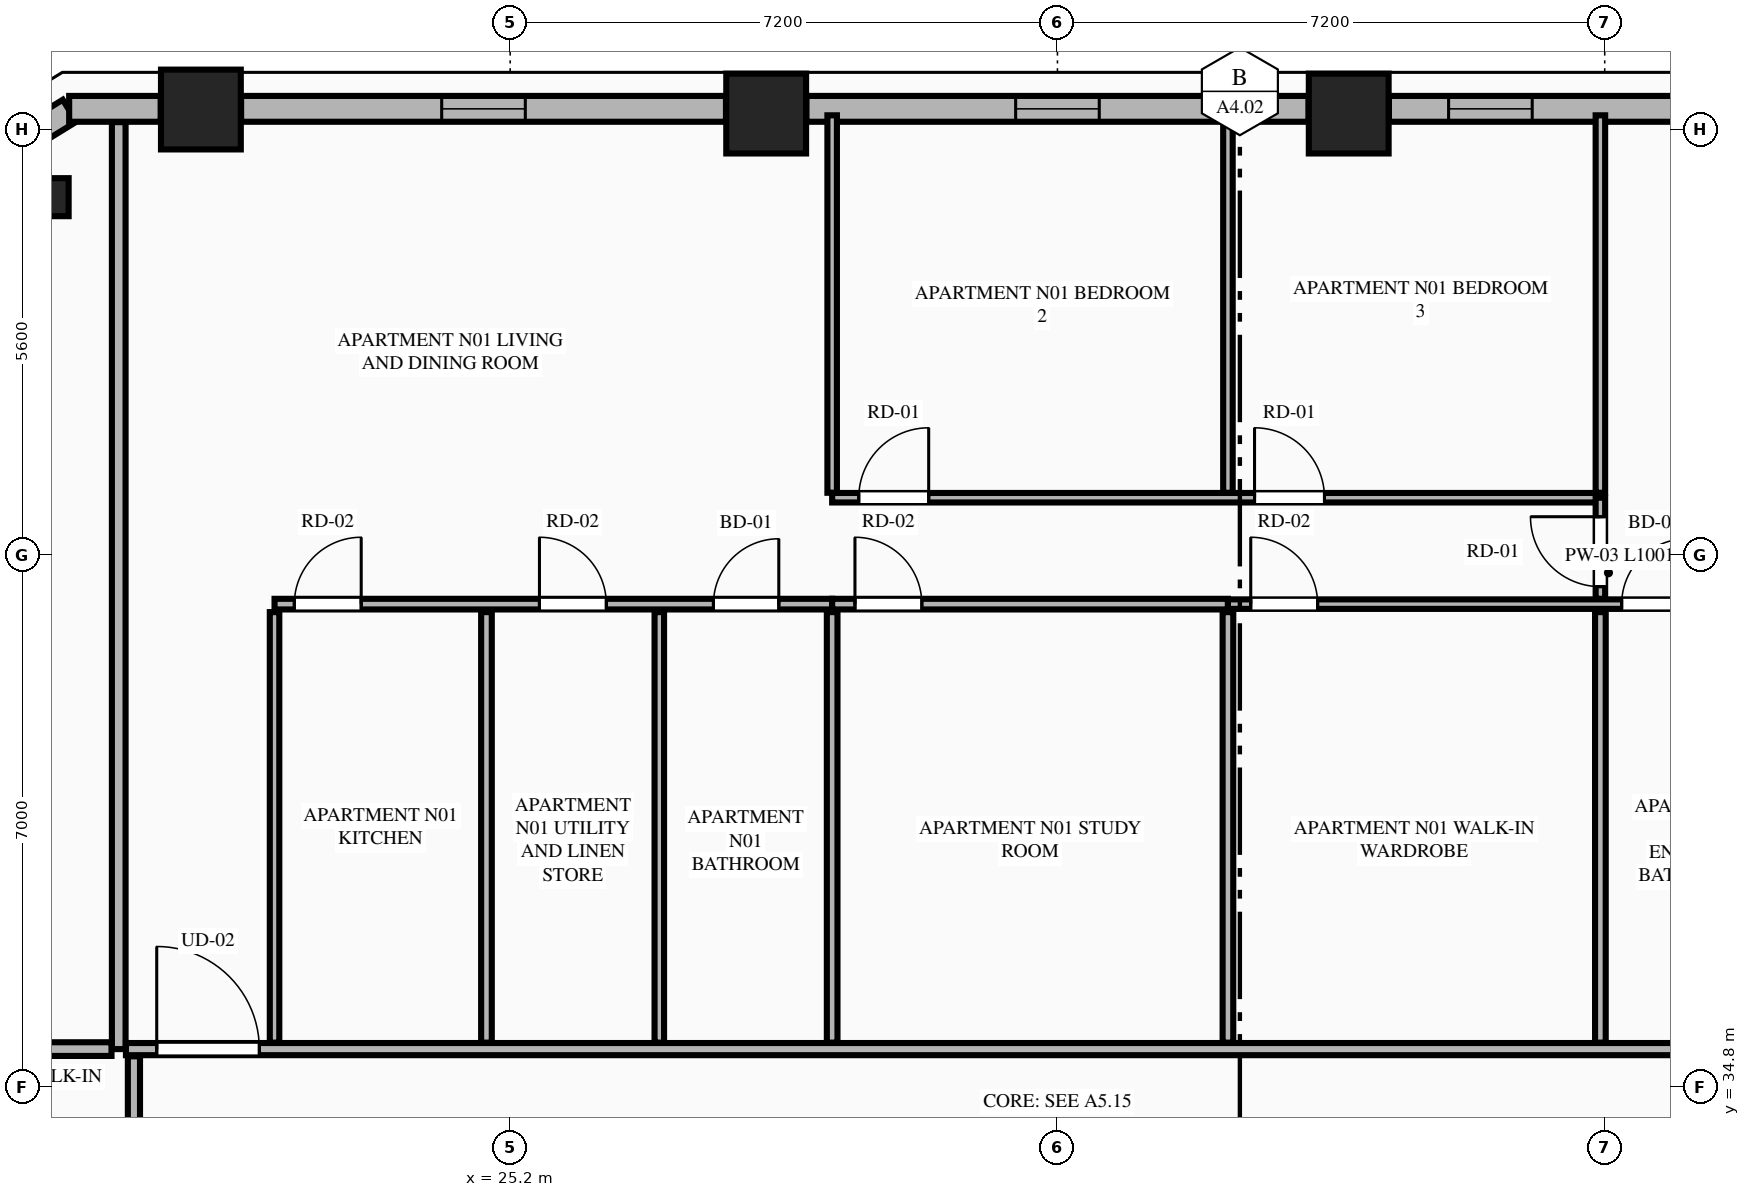
"""IFC4 building model, lengths in metres.
Left out: names, types, materials, properties, quantities, classifications, styles, units other than length and angle.
Written with IfcOpenShell. Run it as: python <this file> out.ifc"""

import sys

from ifc_helpers import new_model, si_unit, direction, frame, frame_2d, origin, origin_2d, place, context, subcontext, project, spatial, rectangle, extrude, element, fill, save


model = new_model("IFC4")
c1 = context("Model", 3, precision=1e-05, world=origin(), true_north=direction((0.0, 1.0)))
c2 = subcontext(c1, "Body", "Model", "MODEL_VIEW")
j1 = project(units=[si_unit("LENGTHUNIT", "METRE"), si_unit("PLANEANGLEUNIT", "RADIAN")], contexts=[c1])
p1 = place(None, origin())
s1 = spatial("IfcSite", under=j1, at=p1, CompositionType="ELEMENT")
p2 = place(p1, origin())
s2 = spatial("IfcBuilding", under=s1, at=p2, CompositionType="ELEMENT")
p3 = place(p2, frame((0.0, 0.0, 126.8)))
s3 = spatial("IfcBuildingStorey", under=s2, at=p3, CompositionType="ELEMENT", Elevation=126.8)
for number, where, z_axis, x_axis in (
    (1, (36.232, 47.608, 0.0), (0.0, 0.0, 1.0), (1.0, 0.0, 0.0)),
    (2, (28.568, 47.608, 0.0), (0.0, 0.0, 1.0), (1.0, 0.0, 0.0)),
    (3, (21.131, 47.661, 0.0), (0.0, 0.0, 1.0), (1.0, 0.0, 0.0)),
):
    element("IfcColumn", number, at=place(p3, frame(where, z_axis=z_axis, x_axis=x_axis)), inside=s3, PredefinedType="COLUMN", context=c2, shape_type="SweptSolid", body=[
        extrude(rectangle(XDim=1.05, YDim=1.05, at=origin_2d()), origin(), (0.0, 0.0, 1.0), 3.55),
    ])
p4 = place(p3, frame((19.141, 46.508, 0.0), z_axis=(0.0, 0.0, 1.0), x_axis=(-0.865160173452, -0.501495637342, 0.0)))
e4 = element("IfcColumn", 4, at=p4, inside=s3, PredefinedType="PILASTER", context=c2, shape_type="SweptSolid", body=[
    extrude(rectangle(XDim=0.5, YDim=0.35, at=origin_2d()), origin(), (0.0, 0.0, 1.0), 3.55),
])
p5 = place(p3, frame((19.403, 47.645, 0.0), z_axis=(0.0, 0.0, 1.0), x_axis=(-0.851798915137, -0.523868884523, 0.0)))
e5 = element("IfcWall", 5, at=p5, inside=s3, PredefinedType="STANDARD", context=c2, shape_type="SweptSolid", body=[
    extrude(rectangle(XDim=1.848, YDim=0.34, at=frame_2d((0.924, 0.0))), origin(), (0.0, 0.0, 1.0), 3.34),
])
p6 = place(p3, frame((43.14, 47.67, 0.0), z_axis=(0.0, 0.0, 1.0), x_axis=(-1.0, 0.0, 0.0)))
e6 = element("IfcWall", 6, at=p6, inside=s3, PredefinedType="STANDARD", context=c2, shape_type="SweptSolid", body=[
    extrude(rectangle(XDim=6.379, YDim=0.34, at=frame_2d((3.189, 0.0))), origin(), (0.0, 0.0, 1.0), 2.797),
])
p7 = place(p6, frame((1.192, 0.0, 0.75)))
e7 = element("IfcOpeningElement", 7, at=p7, cuts=e6, PredefinedType="OPENING", context=c2, shape_type="SweptSolid", body=[
    extrude(rectangle(XDim=1.1, YDim=1.897, at=frame_2d((0.55, 0.948))), frame((0.0, 0.18, 0.0), z_axis=(0.0, -1.0, 0.0), x_axis=(1.0, 0.0, 0.0)), (0.0, 0.0, 1.0), 0.36),
])
p8 = place(p6, frame((4.494, 0.0, 0.75)))
e8 = element("IfcOpeningElement", 8, at=p8, cuts=e6, PredefinedType="OPENING", context=c2, shape_type="SweptSolid", body=[
    extrude(rectangle(XDim=1.1, YDim=1.897, at=frame_2d((0.55, 0.948))), frame((0.0, 0.18, 0.0), z_axis=(0.0, -1.0, 0.0), x_axis=(1.0, 0.0, 0.0)), (0.0, 0.0, 1.0), 0.36),
])
p9 = place(p3, frame((35.703, 47.67, 0.0), z_axis=(0.0, 0.0, 1.0), x_axis=(-1.0, 0.0, 0.0)))
e9 = element("IfcWall", 9, at=p9, inside=s3, PredefinedType="STANDARD", context=c2, shape_type="SweptSolid", body=[
    extrude(rectangle(XDim=6.606, YDim=0.34, at=frame_2d((3.303, 0.0))), origin(), (0.0, 0.0, 1.0), 2.797),
])
p10 = place(p9, frame((2.753, 0.0, 0.75)))
e10 = element("IfcOpeningElement", 10, at=p10, cuts=e9, PredefinedType="OPENING", context=c2, shape_type="SweptSolid", body=[
    extrude(rectangle(XDim=1.1, YDim=1.897, at=frame_2d((0.55, 0.948))), frame((0.0, 0.18, 0.0), z_axis=(0.0, -1.0, 0.0), x_axis=(1.0, 0.0, 0.0)), (0.0, 0.0, 1.0), 0.36),
])
p11 = place(p3, frame((28.039, 47.67, 0.0), z_axis=(0.0, 0.0, 1.0), x_axis=(-1.0, 0.0, 0.0)))
e11 = element("IfcWall", 11, at=p11, inside=s3, PredefinedType="STANDARD", context=c2, shape_type="SweptSolid", body=[
    extrude(rectangle(XDim=6.379, YDim=0.34, at=frame_2d((3.189, 0.0))), origin(), (0.0, 0.0, 1.0), 2.797),
])
p12 = place(p11, frame((2.64, 0.0, 0.75)))
e12 = element("IfcOpeningElement", 12, at=p12, cuts=e11, PredefinedType="OPENING", context=c2, shape_type="SweptSolid", body=[
    extrude(rectangle(XDim=1.1, YDim=1.897, at=frame_2d((0.55, 0.948))), frame((0.0, 0.18, 0.0), z_axis=(0.0, -1.0, 0.0), x_axis=(1.0, 0.0, 0.0)), (0.0, 0.0, 1.0), 0.36),
])
p13 = place(p3, frame((20.602, 47.67, 0.0), z_axis=(0.0, 0.0, 1.0), x_axis=(-1.0, 0.0, 0.0)))
e13 = element("IfcWall", 13, at=p13, inside=s3, PredefinedType="STANDARD", context=c2, shape_type="SweptSolid", body=[
    extrude(rectangle(XDim=1.204, YDim=0.34, at=frame_2d((0.602, 0.0))), origin(), (0.0, 0.0, 1.0), 3.34),
])
p14 = place(p3, frame((20.05, 35.3, 0.0), z_axis=(0.0, 0.0, 1.0), x_axis=(0.0, 1.0, 0.0)))
e14 = element("IfcWall", 14, at=p14, inside=s3, PredefinedType="PARTITIONING", context=c2, shape_type="SweptSolid", body=[
    extrude(rectangle(XDim=12.195, YDim=0.18, at=frame_2d((6.098, 0.0))), origin(), (0.0, 0.0, 1.0), 3.34),
])
p15 = place(p3, frame((20.145, 35.3, 0.0), z_axis=(0.0, 0.0, 1.0), x_axis=(1.0, 0.0, 0.0)))
e15 = element("IfcWall", 15, at=p15, inside=s3, PredefinedType="PARTITIONING", context=c2, shape_type="SweptSolid", body=[
    extrude(rectangle(XDim=24.51, YDim=0.16, at=frame_2d((12.255, 0.0))), origin(), (0.0, 0.0, 1.0), 3.34),
])
p16 = place(p15, frame((0.405, 0.0, 0.0)))
e16 = element("IfcOpeningElement", 16, at=p16, cuts=e15, PredefinedType="OPENING", context=c2, shape_type="SweptSolid", body=[
    extrude(rectangle(XDim=1.35, YDim=2.35, at=frame_2d((0.675, 1.175))), frame((0.0, 0.09, 0.0), z_axis=(0.0, -1.0, 0.0), x_axis=(1.0, 0.0, 0.0)), (0.0, 0.0, 1.0), 0.18),
])
p17 = place(p3, frame((22.1, 35.385, 0.0), z_axis=(0.0, 0.0, 1.0), x_axis=(0.0, 1.0, 0.0)))
e17 = element("IfcWall", 17, at=p17, inside=s3, PredefinedType="PARTITIONING", context=c2, shape_type="SweptSolid", body=[
    extrude(rectangle(XDim=5.664, YDim=0.125, at=frame_2d((2.832, 0.0))), origin(), (0.0, 0.0, 1.0), 2.722),
])
p18 = place(p3, frame((22.1, 41.154, 0.0), z_axis=(0.0, 0.0, 1.0), x_axis=(1.0, 0.0, 0.0)))
e18 = element("IfcWall", 18, at=p18, inside=s3, PredefinedType="PLUMBINGWALL", context=c2, shape_type="SweptSolid", body=[
    extrude(rectangle(XDim=7.336, YDim=0.14, at=frame_2d((3.668, 0.0))), origin(), (0.0, 0.0, 1.0), 3.34),
])
p19 = place(p18, frame((5.774, 0.0, 0.0)))
e19 = element("IfcOpeningElement", 19, at=p19, cuts=e18, PredefinedType="OPENING", context=c2, shape_type="SweptSolid", body=[
    extrude(rectangle(XDim=0.86, YDim=2.1, at=frame_2d((0.43, 1.05))), frame((0.0, 0.08, 0.0), z_axis=(0.0, -1.0, 0.0), x_axis=(1.0, 0.0, 0.0)), (0.0, 0.0, 1.0), 0.16),
])
p20 = place(p18, frame((0.26, 0.0, 0.0)))
e20 = element("IfcOpeningElement", 20, at=p20, cuts=e18, PredefinedType="OPENING", context=c2, shape_type="SweptSolid", body=[
    extrude(rectangle(XDim=0.88, YDim=2.15, at=frame_2d((0.44, 1.075))), frame((0.0, 0.08, 0.0), z_axis=(0.0, -1.0, 0.0), x_axis=(1.0, 0.0, 0.0)), (0.0, 0.0, 1.0), 0.16),
])
p21 = place(p18, frame((3.485, 0.0, 0.0)))
e21 = element("IfcOpeningElement", 21, at=p21, cuts=e18, PredefinedType="OPENING", context=c2, shape_type="SweptSolid", body=[
    extrude(rectangle(XDim=0.88, YDim=2.15, at=frame_2d((0.44, 1.075))), frame((0.0, 0.08, 0.0), z_axis=(0.0, -1.0, 0.0), x_axis=(1.0, 0.0, 0.0)), (0.0, 0.0, 1.0), 0.16),
])
p22 = place(p3, frame((29.436, 41.154, 0.0), z_axis=(0.0, 0.0, 1.0), x_axis=(1.0, 0.0, 0.0)))
e22 = element("IfcWall", 22, at=p22, inside=s3, PredefinedType="PLUMBINGWALL", context=c2, shape_type="SweptSolid", body=[
    extrude(rectangle(XDim=5.207, YDim=0.14, at=frame_2d((2.604, 0.0))), origin(), (0.0, 0.0, 1.0), 3.34),
])
p23 = place(p22, frame((0.3, 0.0, 0.0)))
e23 = element("IfcOpeningElement", 23, at=p23, cuts=e22, PredefinedType="OPENING", context=c2, shape_type="SweptSolid", body=[
    extrude(rectangle(XDim=0.88, YDim=2.15, at=frame_2d((0.44, 1.075))), frame((0.0, 0.08, 0.0), z_axis=(0.0, -1.0, 0.0), x_axis=(1.0, 0.0, 0.0)), (0.0, 0.0, 1.0), 0.16),
])
p24 = place(p3, frame((34.643, 41.154, 0.0), z_axis=(0.0, 0.0, 1.0), x_axis=(1.0, 0.0, 0.0)))
e24 = element("IfcWall", 24, at=p24, inside=s3, PredefinedType="PARTITIONING", context=c2, shape_type="SweptSolid", body=[
    extrude(rectangle(XDim=10.012, YDim=0.125, at=frame_2d((5.006, 0.0))), origin(), (0.0, 0.0, 1.0), 3.34),
])
p25 = place(p24, frame((5.18, 0.0, 0.0)))
e25 = element("IfcOpeningElement", 25, at=p25, cuts=e24, PredefinedType="OPENING", context=c2, shape_type="SweptSolid", body=[
    extrude(rectangle(XDim=0.86, YDim=2.1, at=frame_2d((0.43, 1.05))), frame((0.0, 0.073, 0.0), z_axis=(0.0, -1.0, 0.0), x_axis=(1.0, 0.0, 0.0)), (0.0, 0.0, 1.0), 0.145),
])
p26 = place(p24, frame((7.604, 0.0, 0.0)))
e26 = element("IfcOpeningElement", 26, at=p26, cuts=e24, PredefinedType="OPENING", context=c2, shape_type="SweptSolid", body=[
    extrude(rectangle(XDim=0.88, YDim=2.15, at=frame_2d((0.44, 1.075))), frame((0.0, 0.073, 0.0), z_axis=(0.0, -1.0, 0.0), x_axis=(1.0, 0.0, 0.0)), (0.0, 0.0, 1.0), 0.145),
])
p27 = place(p24, frame((0.3, 0.0, 0.0)))
e27 = element("IfcOpeningElement", 27, at=p27, cuts=e24, PredefinedType="OPENING", context=c2, shape_type="SweptSolid", body=[
    extrude(rectangle(XDim=0.88, YDim=2.15, at=frame_2d((0.44, 1.075))), frame((0.0, 0.073, 0.0), z_axis=(0.0, -1.0, 0.0), x_axis=(1.0, 0.0, 0.0)), (0.0, 0.0, 1.0), 0.145),
])
p28 = place(p3, frame((24.888, 35.385, 0.0), z_axis=(0.0, 0.0, 1.0), x_axis=(0.0, 1.0, 0.0)))
e28 = element("IfcWall", 28, at=p28, inside=s3, PredefinedType="PLUMBINGWALL", context=c2, shape_type="SweptSolid", body=[
    extrude(rectangle(XDim=5.664, YDim=0.14, at=frame_2d((2.832, 0.0))), origin(), (0.0, 0.0, 1.0), 3.34),
])
p29 = place(p3, frame((27.162, 35.385, 0.0), z_axis=(0.0, 0.0, 1.0), x_axis=(0.0, 1.0, 0.0)))
e29 = element("IfcWall", 29, at=p29, inside=s3, PredefinedType="PARTITIONING", context=c2, shape_type="SweptSolid", body=[
    extrude(rectangle(XDim=5.664, YDim=0.125, at=frame_2d((2.832, 0.0))), origin(), (0.0, 0.0, 1.0), 3.34),
])
p30 = place(p3, frame((29.436, 42.619, 0.0), z_axis=(0.0, 0.0, 1.0), x_axis=(0.0, 1.0, 0.0)))
e30 = element("IfcWall", 30, at=p30, inside=s3, PredefinedType="PARTITIONING", context=c2, shape_type="SweptSolid", body=[
    extrude(rectangle(XDim=4.966, YDim=0.125, at=frame_2d((2.483, 0.0))), origin(), (0.0, 0.0, 1.0), 3.34),
])
p31 = place(p3, frame((29.436, 42.554, 0.0), z_axis=(0.0, 0.0, 1.0), x_axis=(1.0, 0.0, 0.0)))
e31 = element("IfcWall", 31, at=p31, inside=s3, PredefinedType="PARTITIONING", context=c2, shape_type="SweptSolid", body=[
    extrude(rectangle(XDim=10.107, YDim=0.125, at=frame_2d((5.053, 0.0))), origin(), (0.0, 0.0, 1.0), 2.975),
])
p32 = place(p31, frame((0.35, 0.0, 0.0)))
e32 = element("IfcOpeningElement", 32, at=p32, cuts=e31, PredefinedType="OPENING", context=c2, shape_type="SweptSolid", body=[
    extrude(rectangle(XDim=0.92, YDim=2.15, at=frame_2d((0.46, 1.075))), frame((0.0, 0.073, 0.0), z_axis=(0.0, -1.0, 0.0), x_axis=(1.0, 0.0, 0.0)), (0.0, 0.0, 1.0), 0.145),
])
p33 = place(p31, frame((5.557, 0.0, 0.0)))
e33 = element("IfcOpeningElement", 33, at=p33, cuts=e31, PredefinedType="OPENING", context=c2, shape_type="SweptSolid", body=[
    extrude(rectangle(XDim=0.92, YDim=2.15, at=frame_2d((0.46, 1.075))), frame((0.0, 0.073, 0.0), z_axis=(0.0, -1.0, 0.0), x_axis=(1.0, 0.0, 0.0)), (0.0, 0.0, 1.0), 0.145),
])
p34 = place(p3, frame((39.543, 41.224, 0.0), z_axis=(0.0, 0.0, 1.0), x_axis=(0.0, 1.0, 0.0)))
e34 = element("IfcWall", 34, at=p34, inside=s3, PredefinedType="PARTITIONING", context=c2, shape_type="SweptSolid", body=[
    extrude(rectangle(XDim=1.33, YDim=0.125, at=frame_2d((0.665, 0.0))), origin(), (0.0, 0.0, 1.0), 3.34),
])
p35 = place(p34, frame((0.16, 0.0, 0.0)))
e35 = element("IfcOpeningElement", 35, at=p35, cuts=e34, PredefinedType="OPENING", context=c2, shape_type="SweptSolid", body=[
    extrude(rectangle(XDim=0.92, YDim=2.15, at=frame_2d((0.46, 1.075))), frame((0.0, 0.073, 0.0), z_axis=(0.0, -1.0, 0.0), x_axis=(1.0, 0.0, 0.0)), (0.0, 0.0, 1.0), 0.145),
])
for number, where, z_axis, x_axis in (
    (36, (29.436, 35.385, 0.0), (0.0, 0.0, 1.0), (0.0, 1.0, 0.0)),
    (37, (34.643, 35.385, 0.0), (0.0, 0.0, 1.0), (0.0, 1.0, 0.0)),
):
    element("IfcWall", number, at=place(p3, frame(where, z_axis=z_axis, x_axis=x_axis)), inside=s3, PredefinedType="PLUMBINGWALL", context=c2, shape_type="SweptSolid", body=[
        extrude(rectangle(XDim=5.664, YDim=0.14, at=frame_2d((2.832, 0.0))), origin(), (0.0, 0.0, 1.0), 3.34),
    ])
for number, where, z_axis, x_axis in (
    (38, (34.643, 42.619, 0.0), (0.0, 0.0, 1.0), (0.0, 1.0, 0.0)),
    (39, (39.543, 42.619, 0.0), (0.0, 0.0, 1.0), (0.0, 1.0, 0.0)),
):
    element("IfcWall", number, at=place(p3, frame(where, z_axis=z_axis, x_axis=x_axis)), inside=s3, PredefinedType="PARTITIONING", context=c2, shape_type="SweptSolid", body=[
        extrude(rectangle(XDim=4.966, YDim=0.125, at=frame_2d((2.483, 0.0))), origin(), (0.0, 0.0, 1.0), 3.34),
    ])
p36 = place(p3, frame((39.543, 35.385, 0.0), z_axis=(0.0, 0.0, 1.0), x_axis=(0.0, 1.0, 0.0)))
e40 = element("IfcWall", 40, at=p36, inside=s3, PredefinedType="PLUMBINGWALL", context=c2, shape_type="SweptSolid", body=[
    extrude(rectangle(XDim=5.664, YDim=0.14, at=frame_2d((2.832, 0.0))), origin(), (0.0, 0.0, 1.0), 3.34),
])
p37 = place(p3, frame((12.286, 35.3, 0.0), z_axis=(0.0, 0.0, 1.0), x_axis=(1.0, 0.0, 0.0)))
e41 = element("IfcWall", 41, at=p37, inside=s3, PredefinedType="PARTITIONING", context=c2, shape_type="SweptSolid", body=[
    extrude(rectangle(XDim=7.669, YDim=0.18, at=frame_2d((3.834, 0.0))), origin(), (0.0, 0.0, 1.0), 3.34),
])
p38 = place(p3, frame((20.25, 16.595, 0.0), z_axis=(0.0, 0.0, 1.0), x_axis=(0.0, 1.0, 0.0)))
e42 = element("IfcWall", 42, at=p38, inside=s3, PredefinedType="PARTITIONING", context=c2, shape_type="SweptSolid", body=[
    extrude(rectangle(XDim=18.61, YDim=0.16, at=frame_2d((9.305, 0.0))), origin(), (0.0, 0.0, 1.0), 3.34),
])
p39 = place(p38, frame((0.45, 0.0, 0.0)))
e43 = element("IfcOpeningElement", 43, at=p39, cuts=e42, PredefinedType="OPENING", context=c2, shape_type="SweptSolid", body=[
    extrude(rectangle(XDim=1.02, YDim=2.25, at=frame_2d((0.51, 1.125))), frame((0.0, 0.09, 0.0), z_axis=(0.0, -1.0, 0.0), x_axis=(1.0, 0.0, 0.0)), (0.0, 0.0, 1.0), 0.18),
])
p40 = place(p10, origin())
e44 = element("IfcWindow", 44, at=p40, inside=s3, PartitioningType="SINGLE_PANEL", PredefinedType="WINDOW", context=c2, shape_type="SweptSolid", body=[
    extrude(rectangle(XDim=1.1, YDim=1.897, at=frame_2d((0.55, 0.948))), frame((0.0, 0.03, 0.0), z_axis=(0.0, -1.0, 0.0), x_axis=(1.0, 0.0, 0.0)), (0.0, 0.0, 1.0), 0.06),
])
fill(e10, e44)
p41 = place(p12, origin())
e45 = element("IfcWindow", 45, at=p41, inside=s3, PartitioningType="SINGLE_PANEL", PredefinedType="WINDOW", context=c2, shape_type="SweptSolid", body=[
    extrude(rectangle(XDim=1.1, YDim=1.897, at=frame_2d((0.55, 0.948))), frame((0.0, 0.03, 0.0), z_axis=(0.0, -1.0, 0.0), x_axis=(1.0, 0.0, 0.0)), (0.0, 0.0, 1.0), 0.06),
])
fill(e12, e45)
p42 = place(p19, origin())
e46 = element("IfcDoor", 46, at=p42, inside=s3, OperationType="SINGLE_SWING_RIGHT", PredefinedType="DOOR", context=c2, shape_type="SweptSolid", body=[
    extrude(rectangle(XDim=0.86, YDim=2.1, at=frame_2d((0.43, 1.05))), frame((0.0, 0.025, 0.0), z_axis=(0.0, -1.0, 0.0), x_axis=(1.0, 0.0, 0.0)), (0.0, 0.0, 1.0), 0.05),
])
fill(e19, e46)
p43 = place(p25, origin())
e47 = element("IfcDoor", 47, at=p43, inside=s3, OperationType="SINGLE_SWING_RIGHT", PredefinedType="DOOR", context=c2, shape_type="SweptSolid", body=[
    extrude(rectangle(XDim=0.86, YDim=2.1, at=frame_2d((0.43, 1.05))), frame((0.0, 0.025, 0.0), z_axis=(0.0, -1.0, 0.0), x_axis=(1.0, 0.0, 0.0)), (0.0, 0.0, 1.0), 0.05),
])
fill(e25, e47)
p44 = place(p16, origin())
e48 = element("IfcDoor", 48, at=p44, inside=s3, OperationType="SINGLE_SWING_LEFT", PredefinedType="DOOR", context=c2, shape_type="SweptSolid", body=[
    extrude(rectangle(XDim=1.35, YDim=2.35, at=frame_2d((0.675, 1.175))), frame((0.0, 0.025, 0.0), z_axis=(0.0, -1.0, 0.0), x_axis=(1.0, 0.0, 0.0)), (0.0, 0.0, 1.0), 0.05),
])
fill(e16, e48)
p45 = place(p20, origin())
e49 = element("IfcDoor", 49, at=p45, inside=s3, OperationType="SINGLE_SWING_RIGHT", PredefinedType="DOOR", context=c2, shape_type="SweptSolid", body=[
    extrude(rectangle(XDim=0.88, YDim=2.15, at=frame_2d((0.44, 1.075))), frame((0.0, 0.025, 0.0), z_axis=(0.0, -1.0, 0.0), x_axis=(1.0, 0.0, 0.0)), (0.0, 0.0, 1.0), 0.05),
])
fill(e20, e49)
p46 = place(p21, origin())
e50 = element("IfcDoor", 50, at=p46, inside=s3, OperationType="SINGLE_SWING_LEFT", PredefinedType="DOOR", context=c2, shape_type="SweptSolid", body=[
    extrude(rectangle(XDim=0.88, YDim=2.15, at=frame_2d((0.44, 1.075))), frame((0.0, 0.025, 0.0), z_axis=(0.0, -1.0, 0.0), x_axis=(1.0, 0.0, 0.0)), (0.0, 0.0, 1.0), 0.05),
])
fill(e21, e50)
p47 = place(p23, origin())
e51 = element("IfcDoor", 51, at=p47, inside=s3, OperationType="SINGLE_SWING_LEFT", PredefinedType="DOOR", context=c2, shape_type="SweptSolid", body=[
    extrude(rectangle(XDim=0.88, YDim=2.15, at=frame_2d((0.44, 1.075))), frame((0.0, 0.025, 0.0), z_axis=(0.0, -1.0, 0.0), x_axis=(1.0, 0.0, 0.0)), (0.0, 0.0, 1.0), 0.05),
])
fill(e23, e51)
p48 = place(p32, origin())
e52 = element("IfcDoor", 52, at=p48, inside=s3, OperationType="SINGLE_SWING_RIGHT", PredefinedType="DOOR", context=c2, shape_type="SweptSolid", body=[
    extrude(rectangle(XDim=0.92, YDim=2.15, at=frame_2d((0.46, 1.075))), frame((0.0, 0.025, 0.0), z_axis=(0.0, -1.0, 0.0), x_axis=(1.0, 0.0, 0.0)), (0.0, 0.0, 1.0), 0.05),
])
fill(e32, e52)
p49 = place(p33, origin())
e53 = element("IfcDoor", 53, at=p49, inside=s3, OperationType="SINGLE_SWING_LEFT", PredefinedType="DOOR", context=c2, shape_type="SweptSolid", body=[
    extrude(rectangle(XDim=0.92, YDim=2.15, at=frame_2d((0.46, 1.075))), frame((0.0, 0.025, 0.0), z_axis=(0.0, -1.0, 0.0), x_axis=(1.0, 0.0, 0.0)), (0.0, 0.0, 1.0), 0.05),
])
fill(e33, e53)
p50 = place(p35, origin())
e54 = element("IfcDoor", 54, at=p50, inside=s3, OperationType="SINGLE_SWING_RIGHT", PredefinedType="DOOR", context=c2, shape_type="SweptSolid", body=[
    extrude(rectangle(XDim=0.92, YDim=2.15, at=frame_2d((0.46, 1.075))), frame((0.0, 0.025, 0.0), z_axis=(0.0, -1.0, 0.0), x_axis=(1.0, 0.0, 0.0)), (0.0, 0.0, 1.0), 0.05),
])
fill(e35, e54)
p51 = place(p27, origin())
e55 = element("IfcDoor", 55, at=p51, inside=s3, OperationType="SINGLE_SWING_LEFT", PredefinedType="DOOR", context=c2, shape_type="SweptSolid", body=[
    extrude(rectangle(XDim=0.88, YDim=2.15, at=frame_2d((0.44, 1.075))), frame((0.0, 0.025, 0.0), z_axis=(0.0, -1.0, 0.0), x_axis=(1.0, 0.0, 0.0)), (0.0, 0.0, 1.0), 0.05),
])
fill(e27, e55)
p52 = place(p8, origin())
e56 = element("IfcWindow", 56, at=p52, inside=s3, PartitioningType="SINGLE_PANEL", PredefinedType="WINDOW", context=c2, shape_type="SweptSolid", body=[
    extrude(rectangle(XDim=1.1, YDim=1.897, at=frame_2d((0.55, 0.948))), frame((0.0, 0.03, 0.0), z_axis=(0.0, -1.0, 0.0), x_axis=(1.0, 0.0, 0.0)), (0.0, 0.0, 1.0), 0.06),
])
fill(e8, e56)
save(model, sys.argv[1])
